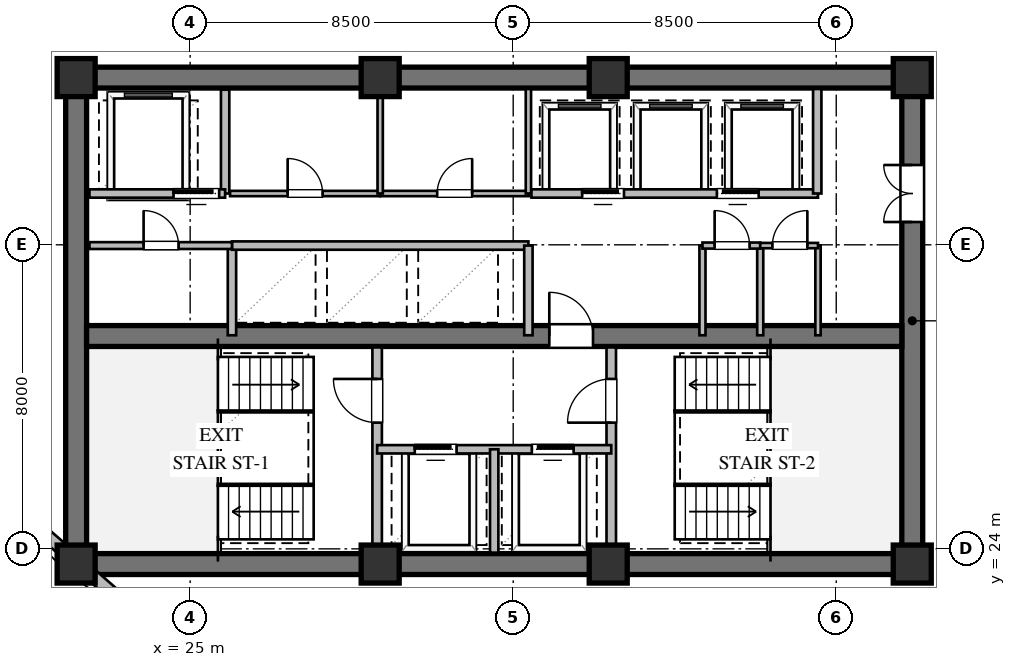
"""IFC4 building model, lengths in metres.
Left out: names, types, materials, properties, quantities, classifications, styles, units other than length and angle.
Written with IfcOpenShell. Run it as: python <this file> out.ifc"""

import sys

from ifc_helpers import new_model, si_unit, direction, frame, frame_2d, origin, origin_2d, place, context, subcontext, project, spatial, rectangle, extrude, element, fill, save


model = new_model("IFC4")
c1 = context("Model", 3, precision=1e-05, world=origin(), true_north=direction((0.0, 1.0)))
c2 = subcontext(c1, "Body", "Model", "MODEL_VIEW")
j1 = project(units=[si_unit("LENGTHUNIT", "METRE"), si_unit("PLANEANGLEUNIT", "RADIAN")], contexts=[c1])
p1 = place(None, origin())
s1 = spatial("IfcSite", under=j1, at=p1, CompositionType="ELEMENT")
p2 = place(p1, origin())
s2 = spatial("IfcBuilding", under=s1, at=p2, CompositionType="ELEMENT")
p3 = place(p2, frame((0.0, 0.0, 120.6)))
s3 = spatial("IfcBuildingStorey", under=s2, at=p3, CompositionType="ELEMENT", Elevation=120.6)
for number, where, z_axis, x_axis in (
    (1, (21.725, 23.6, 0.0), (0.0, 0.0, 1.0), (1.0, 0.0, 0.0)),
    (2, (21.725, 36.4, 0.0), (0.0, 0.0, 1.0), (1.0, 0.0, 0.0)),
):
    element("IfcWall", number, at=place(p3, frame(where, z_axis=z_axis, x_axis=x_axis)), inside=s3, PredefinedType="SHEAR", context=c2, shape_type="SweptSolid", body=[
        extrude(rectangle(XDim=22.55, YDim=0.55, at=frame_2d((11.275, 0.0))), origin(), (0.0, 0.0, 1.0), 3.36),
    ])
p4 = place(p3, frame((22.0, 23.875, 0.0), z_axis=(0.0, 0.0, 1.0), x_axis=(0.0, 1.0, 0.0)))
e3 = element("IfcWall", 3, at=p4, inside=s3, PredefinedType="SHEAR", context=c2, shape_type="SweptSolid", body=[
    extrude(rectangle(XDim=12.25, YDim=0.55, at=frame_2d((6.125, 0.0))), origin(), (0.0, 0.0, 1.0), 3.36),
])
p5 = place(p3, frame((44.0, 23.875, 0.0), z_axis=(0.0, 0.0, 1.0), x_axis=(0.0, 1.0, 0.0)))
e4 = element("IfcWall", 4, at=p5, inside=s3, PredefinedType="SHEAR", context=c2, shape_type="SweptSolid", body=[
    extrude(rectangle(XDim=12.25, YDim=0.55, at=frame_2d((6.125, 0.0))), origin(), (0.0, 0.0, 1.0), 3.36),
])
p6 = place(p5, frame((8.725, 0.0, 0.0)))
e5 = element("IfcOpeningElement", 5, at=p6, cuts=e4, PredefinedType="OPENING", context=c2, shape_type="SweptSolid", body=[
    extrude(rectangle(XDim=1.5, YDim=2.15, at=frame_2d((0.75, 1.075))), frame((0.0, 0.285, 0.0), z_axis=(0.0, -1.0, 0.0), x_axis=(1.0, 0.0, 0.0)), (0.0, 0.0, 1.0), 0.57),
])
p7 = place(p3, frame((22.275, 29.6, 0.0), z_axis=(0.0, 0.0, 1.0), x_axis=(1.0, 0.0, 0.0)))
e6 = element("IfcWall", 6, at=p7, inside=s3, PredefinedType="SHEAR", context=c2, shape_type="SweptSolid", body=[
    extrude(rectangle(XDim=21.45, YDim=0.55, at=frame_2d((10.725, 0.0))), origin(), (0.0, 0.0, 1.0), 3.36),
])
p8 = place(p7, frame((12.175, 0.0, 0.0)))
e7 = element("IfcOpeningElement", 7, at=p8, cuts=e6, PredefinedType="OPENING", context=c2, shape_type="SweptSolid", body=[
    extrude(rectangle(XDim=1.15, YDim=2.1, at=frame_2d((0.575, 1.05))), frame((0.0, 0.285, 0.0), z_axis=(0.0, -1.0, 0.0), x_axis=(1.0, 0.0, 0.0)), (0.0, 0.0, 1.0), 0.57),
])
for number, where, z_axis, x_axis in (
    (8, (22.0, 23.6, 0.0), (0.0, 0.0, 1.0), (1.0, 0.0, 0.0)),
    (9, (30.0, 23.6, 0.0), (0.0, 0.0, 1.0), (1.0, 0.0, 0.0)),
    (10, (36.0, 23.6, 0.0), (0.0, 0.0, 1.0), (1.0, 0.0, 0.0)),
    (11, (44.0, 23.6, 0.0), (0.0, 0.0, 1.0), (1.0, 0.0, 0.0)),
    (12, (44.0, 36.4, 0.0), (0.0, 0.0, 1.0), (1.0, 0.0, 0.0)),
    (13, (36.0, 36.4, 0.0), (0.0, 0.0, 1.0), (1.0, 0.0, 0.0)),
    (14, (30.0, 36.4, 0.0), (0.0, 0.0, 1.0), (1.0, 0.0, 0.0)),
    (15, (22.0, 36.4, 0.0), (0.0, 0.0, 1.0), (1.0, 0.0, 0.0)),
):
    element("IfcColumn", number, at=place(p3, frame(where, z_axis=z_axis, x_axis=x_axis)), inside=s3, PredefinedType="COLUMN", context=c2, shape_type="SweptSolid", body=[
        extrude(rectangle(XDim=1.0, YDim=1.0, at=origin_2d()), origin(), (0.0, 0.0, 1.0), 3.6),
    ])
p9 = place(p3, frame((24.225, 21.727, 0.0), z_axis=(0.0, 0.0, 1.0), x_axis=(-0.753105964003, 0.657899237713, 0.0)))
e16 = element("IfcWall", 16, at=p9, inside=s3, PredefinedType="STANDARD", context=c2, shape_type="SweptSolid", body=[
    extrude(rectangle(XDim=5.998, YDim=0.32, at=frame_2d((2.999, 0.0))), origin(), (0.0, 0.0, 1.0), 2.35),
])
p10 = place(p3, frame((29.92, 23.9, 0.0), z_axis=(0.0, 0.0, 1.0), x_axis=(0.0, 1.0, 0.0)))
e17 = element("IfcWall", 17, at=p10, inside=s3, PredefinedType="SOLIDWALL", context=c2, shape_type="SweptSolid", body=[
    extrude(rectangle(XDim=5.4, YDim=0.25, at=frame_2d((2.7, 0.0))), origin(), (0.0, 0.0, 1.0), 2.89),
])
p11 = place(p10, frame((3.421, 0.0, 0.0)))
e18 = element("IfcOpeningElement", 18, at=p11, cuts=e17, PredefinedType="OPENING", context=c2, shape_type="SweptSolid", body=[
    extrude(rectangle(XDim=1.15, YDim=2.1, at=frame_2d((0.575, 1.05))), frame((0.0, 0.135, 0.0), z_axis=(0.0, -1.0, 0.0), x_axis=(1.0, 0.0, 0.0)), (0.0, 0.0, 1.0), 0.27),
])
p12 = place(p3, frame((36.08, 23.9, 0.0), z_axis=(0.0, 0.0, 1.0), x_axis=(0.0, 1.0, 0.0)))
e19 = element("IfcWall", 19, at=p12, inside=s3, PredefinedType="SOLIDWALL", context=c2, shape_type="SweptSolid", body=[
    extrude(rectangle(XDim=5.4, YDim=0.25, at=frame_2d((2.7, 0.0))), origin(), (0.0, 0.0, 1.0), 3.36),
])
p13 = place(p12, frame((3.421, 0.0, 0.0)))
e20 = element("IfcOpeningElement", 20, at=p13, cuts=e19, PredefinedType="OPENING", context=c2, shape_type="SweptSolid", body=[
    extrude(rectangle(XDim=1.15, YDim=2.1, at=frame_2d((0.575, 1.05))), frame((0.0, 0.135, 0.0), z_axis=(0.0, -1.0, 0.0), x_axis=(1.0, 0.0, 0.0)), (0.0, 0.0, 1.0), 0.27),
])
p14 = place(p3, frame((29.92, 26.62, 0.0), z_axis=(0.0, 0.0, 1.0), x_axis=(1.0, 0.0, 0.0)))
e21 = element("IfcWall", 21, at=p14, inside=s3, PredefinedType="SOLIDWALL", context=c2, shape_type="SweptSolid", body=[
    extrude(rectangle(XDim=6.16, YDim=0.22, at=frame_2d((3.08, 0.0))), origin(), (0.0, 0.0, 1.0), 3.36),
])
p15 = place(p14, frame((0.99, 0.0, 0.0)))
e22 = element("IfcOpeningElement", 22, at=p15, cuts=e21, PredefinedType="OPENING", context=c2, shape_type="SweptSolid", body=[
    extrude(rectangle(XDim=1.1, YDim=2.1, at=frame_2d((0.55, 1.05))), frame((0.0, 0.12, 0.0), z_axis=(0.0, -1.0, 0.0), x_axis=(1.0, 0.0, 0.0)), (0.0, 0.0, 1.0), 0.24),
])
p16 = place(p14, frame((4.07, 0.0, 0.0)))
e23 = element("IfcOpeningElement", 23, at=p16, cuts=e21, PredefinedType="OPENING", context=c2, shape_type="SweptSolid", body=[
    extrude(rectangle(XDim=1.1, YDim=2.1, at=frame_2d((0.55, 1.05))), frame((0.0, 0.12, 0.0), z_axis=(0.0, -1.0, 0.0), x_axis=(1.0, 0.0, 0.0)), (0.0, 0.0, 1.0), 0.24),
])
p17 = place(p3, frame((33.0, 23.9, 0.0), z_axis=(0.0, 0.0, 1.0), x_axis=(0.0, 1.0, 0.0)))
e24 = element("IfcWall", 24, at=p17, inside=s3, PredefinedType="SOLIDWALL", context=c2, shape_type="SweptSolid", body=[
    extrude(rectangle(XDim=2.72, YDim=0.22, at=frame_2d((1.36, 0.0))), origin(), (0.0, 0.0, 1.0), 3.36),
])
p18 = place(p3, frame((25.92, 33.35, 0.0), z_axis=(0.0, 0.0, 1.0), x_axis=(0.0, 1.0, 0.0)))
e25 = element("IfcWall", 25, at=p18, inside=s3, PredefinedType="SOLIDWALL", context=c2, shape_type="SweptSolid", body=[
    extrude(rectangle(XDim=2.73, YDim=0.22, at=frame_2d((1.365, 0.0))), origin(), (0.0, 0.0, 1.0), 3.36),
])
p19 = place(p3, frame((22.35, 33.35, 0.0), z_axis=(0.0, 0.0, 1.0), x_axis=(1.0, 0.0, 0.0)))
e26 = element("IfcWall", 26, at=p19, inside=s3, PredefinedType="SOLIDWALL", context=c2, shape_type="SweptSolid", body=[
    extrude(rectangle(XDim=3.57, YDim=0.22, at=frame_2d((1.785, 0.0))), origin(), (0.0, 0.0, 1.0), 3.36),
])
p20 = place(p19, frame((2.213, 0.0, 0.0)))
e27 = element("IfcOpeningElement", 27, at=p20, cuts=e26, PredefinedType="OPENING", context=c2, shape_type="SweptSolid", body=[
    extrude(rectangle(XDim=1.2, YDim=2.1, at=frame_2d((0.6, 1.05))), frame((0.0, 0.12, 0.0), z_axis=(0.0, -1.0, 0.0), x_axis=(1.0, 0.0, 0.0)), (0.0, 0.0, 1.0), 0.24),
])
p21 = place(p3, frame((26.1, 29.62, 0.0), z_axis=(0.0, 0.0, 1.0), x_axis=(0.0, 1.0, 0.0)))
e28 = element("IfcWall", 28, at=p21, inside=s3, PredefinedType="SOLIDWALL", context=c2, shape_type="SweptSolid", body=[
    extrude(rectangle(XDim=2.36, YDim=0.22, at=frame_2d((1.18, 0.0))), origin(), (0.0, 0.0, 1.0), 3.36),
])
p22 = place(p3, frame((26.1, 31.98, 0.0), z_axis=(0.0, 0.0, 1.0), x_axis=(1.0, 0.0, 0.0)))
e29 = element("IfcWall", 29, at=p22, inside=s3, PredefinedType="SOLIDWALL", context=c2, shape_type="SweptSolid", body=[
    extrude(rectangle(XDim=7.8, YDim=0.22, at=frame_2d((3.9, 0.0))), origin(), (0.0, 0.0, 1.0), 3.36),
])
p23 = place(p3, frame((33.9, 29.62, 0.0), z_axis=(0.0, 0.0, 1.0), x_axis=(0.0, 1.0, 0.0)))
e30 = element("IfcWall", 30, at=p23, inside=s3, PredefinedType="SOLIDWALL", context=c2, shape_type="SweptSolid", body=[
    extrude(rectangle(XDim=2.36, YDim=0.22, at=frame_2d((1.18, 0.0))), origin(), (0.0, 0.0, 1.0), 3.36),
])
p24 = place(p3, frame((26.05, 33.35, 0.0), z_axis=(0.0, 0.0, 1.0), x_axis=(1.0, 0.0, 0.0)))
e31 = element("IfcWall", 31, at=p24, inside=s3, PredefinedType="PARTITIONING", context=c2, shape_type="SweptSolid", body=[
    extrude(rectangle(XDim=3.95, YDim=0.14, at=frame_2d((1.975, 0.0))), origin(), (0.0, 0.0, 1.0), 3.36),
])
p25 = place(p24, frame((1.515, 0.0, 0.0)))
e32 = element("IfcOpeningElement", 32, at=p25, cuts=e31, PredefinedType="OPENING", context=c2, shape_type="SweptSolid", body=[
    extrude(rectangle(XDim=0.92, YDim=2.1, at=frame_2d((0.46, 1.05))), frame((0.0, 0.08, 0.0), z_axis=(0.0, -1.0, 0.0), x_axis=(1.0, 0.0, 0.0)), (0.0, 0.0, 1.0), 0.16),
])
p26 = place(p3, frame((30.0, 33.35, 0.0), z_axis=(0.0, 0.0, 1.0), x_axis=(1.0, 0.0, 0.0)))
e33 = element("IfcWall", 33, at=p26, inside=s3, PredefinedType="PARTITIONING", context=c2, shape_type="SweptSolid", body=[
    extrude(rectangle(XDim=3.92, YDim=0.14, at=frame_2d((1.96, 0.0))), origin(), (0.0, 0.0, 1.0), 3.36),
])
p27 = place(p26, frame((1.5, 0.0, 0.0)))
e34 = element("IfcOpeningElement", 34, at=p27, cuts=e33, PredefinedType="OPENING", context=c2, shape_type="SweptSolid", body=[
    extrude(rectangle(XDim=0.92, YDim=2.1, at=frame_2d((0.46, 1.05))), frame((0.0, 0.08, 0.0), z_axis=(0.0, -1.0, 0.0), x_axis=(1.0, 0.0, 0.0)), (0.0, 0.0, 1.0), 0.16),
])
for number, where, z_axis, x_axis in (
    (35, (30.0, 33.35, 0.0), (0.0, 0.0, 1.0), (0.0, 1.0, 0.0)),
    (36, (33.9, 33.35, 0.0), (0.0, 0.0, 1.0), (0.0, 1.0, 0.0)),
):
    element("IfcWall", number, at=place(p3, frame(where, z_axis=z_axis, x_axis=x_axis)), inside=s3, PredefinedType="PARTITIONING", context=c2, shape_type="SweptSolid", body=[
        extrude(rectangle(XDim=2.75, YDim=0.14, at=frame_2d((1.375, 0.0))), origin(), (0.0, 0.0, 1.0), 3.36),
    ])
p28 = place(p3, frame((33.98, 33.35, 0.0), z_axis=(0.0, 0.0, 1.0), x_axis=(1.0, 0.0, 0.0)))
e37 = element("IfcWall", 37, at=p28, inside=s3, PredefinedType="SOLIDWALL", context=c2, shape_type="SweptSolid", body=[
    extrude(rectangle(XDim=7.54, YDim=0.22, at=frame_2d((3.77, 0.0))), origin(), (0.0, 0.0, 1.0), 3.36),
])
p29 = place(p28, frame((1.335, 0.0, 0.0)))
e38 = element("IfcOpeningElement", 38, at=p29, cuts=e37, PredefinedType="OPENING", context=c2, shape_type="SweptSolid", body=[
    extrude(rectangle(XDim=1.1, YDim=2.1, at=frame_2d((0.55, 1.05))), frame((0.0, 0.12, 0.0), z_axis=(0.0, -1.0, 0.0), x_axis=(1.0, 0.0, 0.0)), (0.0, 0.0, 1.0), 0.24),
])
p30 = place(p28, frame((4.879, 0.0, 0.0)))
e39 = element("IfcOpeningElement", 39, at=p30, cuts=e37, PredefinedType="OPENING", context=c2, shape_type="SweptSolid", body=[
    extrude(rectangle(XDim=1.1, YDim=2.1, at=frame_2d((0.55, 1.05))), frame((0.0, 0.12, 0.0), z_axis=(0.0, -1.0, 0.0), x_axis=(1.0, 0.0, 0.0)), (0.0, 0.0, 1.0), 0.24),
])
p31 = place(p3, frame((41.5, 33.35, 0.0), z_axis=(0.0, 0.0, 1.0), x_axis=(0.0, 1.0, 0.0)))
e40 = element("IfcWall", 40, at=p31, inside=s3, PredefinedType="SOLIDWALL", context=c2, shape_type="SweptSolid", body=[
    extrude(rectangle(XDim=2.75, YDim=0.22, at=frame_2d((1.375, 0.0))), origin(), (0.0, 0.0, 1.0), 3.36),
])
p32 = place(p3, frame((22.35, 31.98, 0.0), z_axis=(0.0, 0.0, 1.0), x_axis=(1.0, 0.0, 0.0)))
e41 = element("IfcWall", 41, at=p32, inside=s3, PredefinedType="PARTITIONING", context=c2, shape_type="SweptSolid", body=[
    extrude(rectangle(XDim=3.75, YDim=0.18, at=frame_2d((1.875, 0.0))), origin(), (0.0, 0.0, 1.0), 3.36),
])
p33 = place(p32, frame((1.425, 0.0, 0.0)))
e42 = element("IfcOpeningElement", 42, at=p33, cuts=e41, PredefinedType="OPENING", context=c2, shape_type="SweptSolid", body=[
    extrude(rectangle(XDim=0.92, YDim=2.1, at=frame_2d((0.46, 1.05))), frame((0.0, 0.1, 0.0), z_axis=(0.0, -1.0, 0.0), x_axis=(1.0, 0.0, 0.0)), (0.0, 0.0, 1.0), 0.2),
])
for number, where, z_axis, x_axis in (
    (43, (38.48, 29.62, 0.0), (0.0, 0.0, 1.0), (0.0, 1.0, 0.0)),
    (44, (40.0, 29.62, 0.0), (0.0, 0.0, 1.0), (0.0, 1.0, 0.0)),
):
    element("IfcWall", number, at=place(p3, frame(where, z_axis=z_axis, x_axis=x_axis)), inside=s3, PredefinedType="PLUMBINGWALL", context=c2, shape_type="SweptSolid", body=[
        extrude(rectangle(XDim=2.36, YDim=0.16, at=frame_2d((1.18, 0.0))), origin(), (0.0, 0.0, 1.0), 3.36),
    ])
p34 = place(p3, frame((41.52, 29.62, 0.0), z_axis=(0.0, 0.0, 1.0), x_axis=(0.0, 1.0, 0.0)))
e45 = element("IfcWall", 45, at=p34, inside=s3, PredefinedType="PARTITIONING", context=c2, shape_type="SweptSolid", body=[
    extrude(rectangle(XDim=2.36, YDim=0.14, at=frame_2d((1.18, 0.0))), origin(), (0.0, 0.0, 1.0), 3.36),
])
p35 = place(p3, frame((38.48, 31.98, 0.0), z_axis=(0.0, 0.0, 1.0), x_axis=(1.0, 0.0, 0.0)))
e46 = element("IfcWall", 46, at=p35, inside=s3, PredefinedType="PLUMBINGWALL", context=c2, shape_type="SweptSolid", body=[
    extrude(rectangle(XDim=1.52, YDim=0.16, at=frame_2d((0.76, 0.0))), origin(), (0.0, 0.0, 1.0), 3.36),
])
p36 = place(p35, frame((0.32, 0.0, 0.0)))
e47 = element("IfcOpeningElement", 47, at=p36, cuts=e46, PredefinedType="OPENING", context=c2, shape_type="SweptSolid", body=[
    extrude(rectangle(XDim=0.92, YDim=2.1, at=frame_2d((0.46, 1.05))), frame((0.0, 0.09, 0.0), z_axis=(0.0, -1.0, 0.0), x_axis=(1.0, 0.0, 0.0)), (0.0, 0.0, 1.0), 0.18),
])
p37 = place(p3, frame((40.0, 31.98, 0.0), z_axis=(0.0, 0.0, 1.0), x_axis=(1.0, 0.0, 0.0)))
e48 = element("IfcWall", 48, at=p37, inside=s3, PredefinedType="PARTITIONING", context=c2, shape_type="SweptSolid", body=[
    extrude(rectangle(XDim=1.52, YDim=0.14, at=frame_2d((0.76, 0.0))), origin(), (0.0, 0.0, 1.0), 3.36),
])
p38 = place(p37, frame((0.32, 0.0, 0.0)))
e49 = element("IfcOpeningElement", 49, at=p38, cuts=e48, PredefinedType="OPENING", context=c2, shape_type="SweptSolid", body=[
    extrude(rectangle(XDim=0.92, YDim=2.1, at=frame_2d((0.46, 1.05))), frame((0.0, 0.08, 0.0), z_axis=(0.0, -1.0, 0.0), x_axis=(1.0, 0.0, 0.0)), (0.0, 0.0, 1.0), 0.16),
])
p39 = place(p11, origin())
e50 = element("IfcDoor", 50, at=p39, inside=s3, OperationType="SINGLE_SWING_RIGHT", PredefinedType="DOOR", context=c2, shape_type="SweptSolid", body=[
    extrude(rectangle(XDim=1.15, YDim=2.1, at=frame_2d((0.575, 1.05))), frame((0.0, 0.025, 0.0), z_axis=(0.0, -1.0, 0.0), x_axis=(1.0, 0.0, 0.0)), (0.0, 0.0, 1.0), 0.05),
])
fill(e18, e50)
p40 = place(p13, origin())
e51 = element("IfcDoor", 51, at=p40, inside=s3, OperationType="SINGLE_SWING_LEFT", PredefinedType="DOOR", context=c2, shape_type="SweptSolid", body=[
    extrude(rectangle(XDim=1.15, YDim=2.1, at=frame_2d((0.575, 1.05))), frame((0.0, 0.025, 0.0), z_axis=(0.0, -1.0, 0.0), x_axis=(1.0, 0.0, 0.0)), (0.0, 0.0, 1.0), 0.05),
])
fill(e20, e51)
p41 = place(p15, origin())
e52 = element("IfcDoor", 52, at=p41, inside=s3, OperationType="SLIDING_TO_LEFT", PredefinedType="DOOR", context=c2, shape_type="SweptSolid", body=[
    extrude(rectangle(XDim=1.1, YDim=2.1, at=frame_2d((0.55, 1.05))), frame((0.0, 0.025, 0.0), z_axis=(0.0, -1.0, 0.0), x_axis=(1.0, 0.0, 0.0)), (0.0, 0.0, 1.0), 0.05),
])
fill(e22, e52)
p42 = place(p16, origin())
e53 = element("IfcDoor", 53, at=p42, inside=s3, OperationType="SLIDING_TO_RIGHT", PredefinedType="DOOR", context=c2, shape_type="SweptSolid", body=[
    extrude(rectangle(XDim=1.1, YDim=2.1, at=frame_2d((0.55, 1.05))), frame((0.0, 0.025, 0.0), z_axis=(0.0, -1.0, 0.0), x_axis=(1.0, 0.0, 0.0)), (0.0, 0.0, 1.0), 0.05),
])
fill(e23, e53)
p43 = place(p8, origin())
e54 = element("IfcDoor", 54, at=p43, inside=s3, OperationType="SINGLE_SWING_LEFT", PredefinedType="DOOR", context=c2, shape_type="SweptSolid", body=[
    extrude(rectangle(XDim=1.15, YDim=2.1, at=frame_2d((0.575, 1.05))), frame((0.0, 0.025, 0.0), z_axis=(0.0, -1.0, 0.0), x_axis=(1.0, 0.0, 0.0)), (0.0, 0.0, 1.0), 0.05),
])
fill(e7, e54)
p44 = place(p6, origin())
e55 = element("IfcDoor", 55, at=p44, inside=s3, OperationType="DOUBLE_DOOR_SINGLE_SWING", PredefinedType="DOOR", context=c2, shape_type="SweptSolid", body=[
    extrude(rectangle(XDim=1.5, YDim=2.15, at=frame_2d((0.75, 1.075))), frame((0.0, 0.025, 0.0), z_axis=(0.0, -1.0, 0.0), x_axis=(1.0, 0.0, 0.0)), (0.0, 0.0, 1.0), 0.05),
])
fill(e5, e55)
p45 = place(p20, origin())
e56 = element("IfcDoor", 56, at=p45, inside=s3, OperationType="SLIDING_TO_LEFT", PredefinedType="DOOR", context=c2, shape_type="SweptSolid", body=[
    extrude(rectangle(XDim=1.2, YDim=2.1, at=frame_2d((0.6, 1.05))), frame((0.0, 0.025, 0.0), z_axis=(0.0, -1.0, 0.0), x_axis=(1.0, 0.0, 0.0)), (0.0, 0.0, 1.0), 0.05),
])
fill(e27, e56)
p46 = place(p25, origin())
e57 = element("IfcDoor", 57, at=p46, inside=s3, OperationType="SINGLE_SWING_LEFT", PredefinedType="DOOR", context=c2, shape_type="SweptSolid", body=[
    extrude(rectangle(XDim=0.92, YDim=2.1, at=frame_2d((0.46, 1.05))), frame((0.0, 0.025, 0.0), z_axis=(0.0, -1.0, 0.0), x_axis=(1.0, 0.0, 0.0)), (0.0, 0.0, 1.0), 0.05),
])
fill(e32, e57)
p47 = place(p27, origin())
e58 = element("IfcDoor", 58, at=p47, inside=s3, OperationType="SINGLE_SWING_RIGHT", PredefinedType="DOOR", context=c2, shape_type="SweptSolid", body=[
    extrude(rectangle(XDim=0.92, YDim=2.1, at=frame_2d((0.46, 1.05))), frame((0.0, 0.025, 0.0), z_axis=(0.0, -1.0, 0.0), x_axis=(1.0, 0.0, 0.0)), (0.0, 0.0, 1.0), 0.05),
])
fill(e34, e58)
p48 = place(p29, origin())
e59 = element("IfcDoor", 59, at=p48, inside=s3, OperationType="SLIDING_TO_LEFT", PredefinedType="DOOR", context=c2, shape_type="SweptSolid", body=[
    extrude(rectangle(XDim=1.1, YDim=2.1, at=frame_2d((0.55, 1.05))), frame((0.0, 0.025, 0.0), z_axis=(0.0, -1.0, 0.0), x_axis=(1.0, 0.0, 0.0)), (0.0, 0.0, 1.0), 0.05),
])
fill(e38, e59)
p49 = place(p30, origin())
e60 = element("IfcDoor", 60, at=p49, inside=s3, OperationType="SLIDING_TO_RIGHT", PredefinedType="DOOR", context=c2, shape_type="SweptSolid", body=[
    extrude(rectangle(XDim=1.1, YDim=2.1, at=frame_2d((0.55, 1.05))), frame((0.0, 0.025, 0.0), z_axis=(0.0, -1.0, 0.0), x_axis=(1.0, 0.0, 0.0)), (0.0, 0.0, 1.0), 0.05),
])
fill(e39, e60)
p50 = place(p33, origin())
e61 = element("IfcDoor", 61, at=p50, inside=s3, OperationType="SINGLE_SWING_LEFT", PredefinedType="DOOR", context=c2, shape_type="SweptSolid", body=[
    extrude(rectangle(XDim=0.92, YDim=2.1, at=frame_2d((0.46, 1.05))), frame((0.0, 0.025, 0.0), z_axis=(0.0, -1.0, 0.0), x_axis=(1.0, 0.0, 0.0)), (0.0, 0.0, 1.0), 0.05),
])
fill(e42, e61)
p51 = place(p36, origin())
e62 = element("IfcDoor", 62, at=p51, inside=s3, OperationType="SINGLE_SWING_LEFT", PredefinedType="DOOR", context=c2, shape_type="SweptSolid", body=[
    extrude(rectangle(XDim=0.92, YDim=2.1, at=frame_2d((0.46, 1.05))), frame((0.0, 0.025, 0.0), z_axis=(0.0, -1.0, 0.0), x_axis=(1.0, 0.0, 0.0)), (0.0, 0.0, 1.0), 0.05),
])
fill(e47, e62)
p52 = place(p38, origin())
e63 = element("IfcDoor", 63, at=p52, inside=s3, OperationType="SINGLE_SWING_RIGHT", PredefinedType="DOOR", context=c2, shape_type="SweptSolid", body=[
    extrude(rectangle(XDim=0.92, YDim=2.1, at=frame_2d((0.46, 1.05))), frame((0.0, 0.025, 0.0), z_axis=(0.0, -1.0, 0.0), x_axis=(1.0, 0.0, 0.0)), (0.0, 0.0, 1.0), 0.05),
])
fill(e49, e63)
save(model, sys.argv[1])
